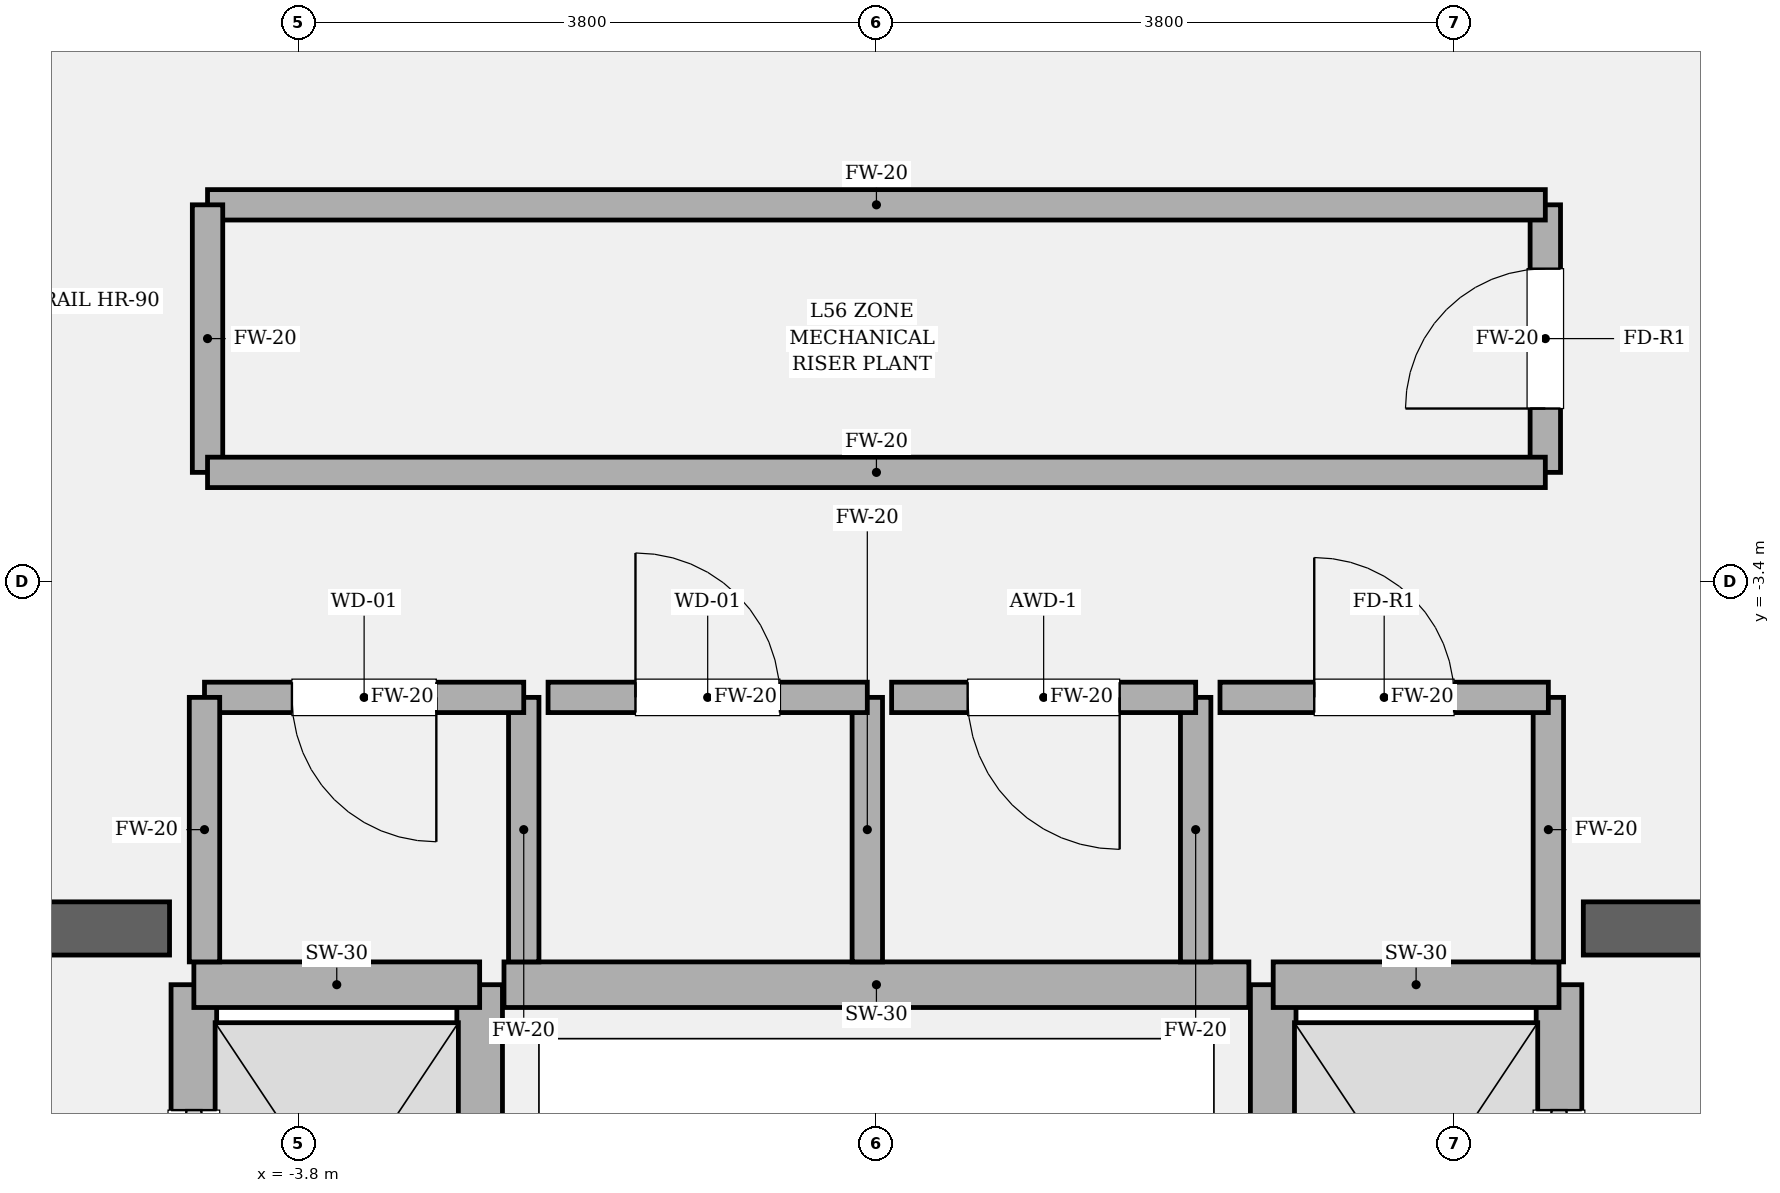
"""IFC4 building model, lengths in metres.
Left out: names, types, materials, properties, quantities, classifications, styles, units other than length and angle.
Written with IfcOpenShell. Run it as: python <this file> out.ifc"""

import sys

from ifc_helpers import new_model, si_unit, direction, frame, frame_2d, origin, place, context, subcontext, project, spatial, rectangle, extrude, element, fill, save


model = new_model("IFC4")
c1 = context("Model", 3, precision=1e-05, world=origin(), true_north=direction((0.0, 1.0)))
c2 = subcontext(c1, "Body", "Model", "MODEL_VIEW")
j1 = project(units=[si_unit("LENGTHUNIT", "METRE"), si_unit("PLANEANGLEUNIT", "RADIAN")], contexts=[c1])
p1 = place(None, origin())
s1 = spatial("IfcSite", under=j1, at=p1, CompositionType="ELEMENT")
p2 = place(p1, origin())
s2 = spatial("IfcBuilding", under=s1, at=p2, CompositionType="ELEMENT")
p3 = place(p2, frame((0.0, 0.0, 237.0)))
s3 = spatial("IfcBuildingStorey", under=s2, at=p3, CompositionType="ELEMENT", Elevation=237.0)
p4 = place(p3, frame((-9.925, -5.68, 0.0), z_axis=(0.0, 0.0, 1.0), x_axis=(1.0, 0.0, 0.0)))
e1 = element("IfcWall", 1, at=p4, inside=s3, PredefinedType="SOLIDWALL", context=c2, shape_type="SweptSolid", body=[
    extrude(rectangle(XDim=5.275, YDim=0.35, at=frame_2d((2.638, 0.0))), origin(), (0.0, 0.0, 1.0), 4.8),
])
p5 = place(p4, frame((1.385, 0.0, 0.0)))
e2 = element("IfcOpeningElement", 2, at=p5, cuts=e1, PredefinedType="OPENING", context=c2, shape_type="SweptSolid", body=[
    extrude(rectangle(XDim=1.18, YDim=2.2, at=frame_2d((0.59, 1.1))), frame((0.0, 0.185, 0.0), z_axis=(0.0, -1.0, 0.0), x_axis=(1.0, 0.0, 0.0)), (0.0, 0.0, 1.0), 0.37),
])
p6 = place(p3, frame((4.65, -5.68, 0.0), z_axis=(0.0, 0.0, 1.0), x_axis=(1.0, 0.0, 0.0)))
e3 = element("IfcWall", 3, at=p6, inside=s3, PredefinedType="SOLIDWALL", context=c2, shape_type="SweptSolid", body=[
    extrude(rectangle(XDim=5.275, YDim=0.35, at=frame_2d((2.638, 0.0))), origin(), (0.0, 0.0, 1.0), 4.8),
])
p7 = place(p6, frame((2.71, 0.0, 0.0)))
e4 = element("IfcOpeningElement", 4, at=p7, cuts=e3, PredefinedType="OPENING", context=c2, shape_type="SweptSolid", body=[
    extrude(rectangle(XDim=1.18, YDim=2.2, at=frame_2d((0.59, 1.1))), frame((0.0, 0.185, 0.0), z_axis=(0.0, -1.0, 0.0), x_axis=(1.0, 0.0, 0.0)), (0.0, 0.0, 1.0), 0.37),
])
p8 = place(p3, frame((-4.49, -8.82, 0.0), z_axis=(0.0, 0.0, 1.0), x_axis=(0.0, 1.0, 0.0)))
e5 = element("IfcWall", 5, at=p8, inside=s3, PredefinedType="SOLIDWALL", context=c2, shape_type="SweptSolid", body=[
    extrude(rectangle(XDim=2.77, YDim=0.3, at=frame_2d((1.385, 0.0))), origin(), (0.0, 0.0, 1.0), 4.48),
])
p9 = place(p8, frame((0.825, 0.0, 0.0)))
e6 = element("IfcOpeningElement", 6, at=p9, cuts=e5, PredefinedType="OPENING", context=c2, shape_type="SweptSolid", body=[
    extrude(rectangle(XDim=1.12, YDim=2.25, at=frame_2d((0.56, 1.125))), frame((0.0, 0.16, 0.0), z_axis=(0.0, -1.0, 0.0), x_axis=(1.0, 0.0, 0.0)), (0.0, 0.0, 1.0), 0.32),
])
p10 = place(p3, frame((-2.61, -8.82, 0.0), z_axis=(0.0, 0.0, 1.0), x_axis=(0.0, 1.0, 0.0)))
e7 = element("IfcWall", 7, at=p10, inside=s3, PredefinedType="SOLIDWALL", context=c2, shape_type="SweptSolid", body=[
    extrude(rectangle(XDim=2.77, YDim=0.3, at=frame_2d((1.385, 0.0))), origin(), (0.0, 0.0, 1.0), 4.48),
])
p11 = place(p3, frame((-4.49, -6.05, 0.0), z_axis=(0.0, 0.0, 1.0), x_axis=(1.0, 0.0, 0.0)))
e8 = element("IfcWall", 8, at=p11, inside=s3, PredefinedType="SOLIDWALL", context=c2, shape_type="SweptSolid", body=[
    extrude(rectangle(XDim=1.88, YDim=0.3, at=frame_2d((0.94, 0.0))), origin(), (0.0, 0.0, 1.0), 4.48),
])
p12 = place(p3, frame((4.49, -8.82, 0.0), z_axis=(0.0, 0.0, 1.0), x_axis=(0.0, 1.0, 0.0)))
e9 = element("IfcWall", 9, at=p12, inside=s3, PredefinedType="SOLIDWALL", context=c2, shape_type="SweptSolid", body=[
    extrude(rectangle(XDim=2.77, YDim=0.3, at=frame_2d((1.385, 0.0))), origin(), (0.0, 0.0, 1.0), 4.48),
])
p13 = place(p12, frame((0.825, 0.0, 0.0)))
e10 = element("IfcOpeningElement", 10, at=p13, cuts=e9, PredefinedType="OPENING", context=c2, shape_type="SweptSolid", body=[
    extrude(rectangle(XDim=1.12, YDim=2.25, at=frame_2d((0.56, 1.125))), frame((0.0, 0.16, 0.0), z_axis=(0.0, -1.0, 0.0), x_axis=(1.0, 0.0, 0.0)), (0.0, 0.0, 1.0), 0.32),
])
p14 = place(p3, frame((2.61, -8.82, 0.0), z_axis=(0.0, 0.0, 1.0), x_axis=(0.0, 1.0, 0.0)))
e11 = element("IfcWall", 11, at=p14, inside=s3, PredefinedType="SOLIDWALL", context=c2, shape_type="SweptSolid", body=[
    extrude(rectangle(XDim=2.77, YDim=0.3, at=frame_2d((1.385, 0.0))), origin(), (0.0, 0.0, 1.0), 4.48),
])
p15 = place(p3, frame((2.61, -6.05, 0.0), z_axis=(0.0, 0.0, 1.0), x_axis=(1.0, 0.0, 0.0)))
e12 = element("IfcWall", 12, at=p15, inside=s3, PredefinedType="SOLIDWALL", context=c2, shape_type="SweptSolid", body=[
    extrude(rectangle(XDim=1.88, YDim=0.3, at=frame_2d((0.94, 0.0))), origin(), (0.0, 0.0, 1.0), 4.48),
])
p16 = place(p3, frame((-2.45, -6.05, 0.0), z_axis=(0.0, 0.0, 1.0), x_axis=(1.0, 0.0, 0.0)))
e13 = element("IfcWall", 13, at=p16, inside=s3, PredefinedType="SOLIDWALL", context=c2, shape_type="SweptSolid", body=[
    extrude(rectangle(XDim=4.9, YDim=0.3, at=frame_2d((2.45, 0.0))), origin(), (0.0, 0.0, 1.0), 4.48),
])
p17 = place(p3, frame((-2.32, -5.9, 0.0), z_axis=(0.0, 0.0, 1.0), x_axis=(0.0, 1.0, 0.0)))
e14 = element("IfcWall", 14, at=p17, inside=s3, PredefinedType="SOLIDWALL", context=c2, shape_type="SweptSolid", body=[
    extrude(rectangle(XDim=1.74, YDim=0.2, at=frame_2d((0.87, 0.0))), origin(), (0.0, 0.0, 1.0), 4.48),
])
p18 = place(p3, frame((-2.32, -4.16, 0.0), z_axis=(0.0, 0.0, 1.0), x_axis=(-1.0, 0.0, 0.0)))
e15 = element("IfcWall", 15, at=p18, inside=s3, PredefinedType="SOLIDWALL", context=c2, shape_type="SweptSolid", body=[
    extrude(rectangle(XDim=2.1, YDim=0.2, at=frame_2d((1.05, 0.0))), origin(), (0.0, 0.0, 1.0), 4.48),
])
p19 = place(p18, frame((0.575, 0.0, 0.0)))
e16 = element("IfcOpeningElement", 16, at=p19, cuts=e15, PredefinedType="OPENING", context=c2, shape_type="SweptSolid", body=[
    extrude(rectangle(XDim=0.95, YDim=2.15, at=frame_2d((0.475, 1.075))), frame((0.0, 0.11, 0.0), z_axis=(0.0, -1.0, 0.0), x_axis=(1.0, 0.0, 0.0)), (0.0, 0.0, 1.0), 0.22),
])
for number, where, z_axis, x_axis in (
    (17, (-4.42, -4.16, 0.0), (0.0, 0.0, 1.0), (0.0, -1.0, 0.0)),
    (18, (-0.06, -5.9, 0.0), (0.0, 0.0, 1.0), (0.0, 1.0, 0.0)),
):
    element("IfcWall", number, at=place(p3, frame(where, z_axis=z_axis, x_axis=x_axis)), inside=s3, PredefinedType="SOLIDWALL", context=c2, shape_type="SweptSolid", body=[
        extrude(rectangle(XDim=1.74, YDim=0.2, at=frame_2d((0.87, 0.0))), origin(), (0.0, 0.0, 1.0), 4.48),
    ])
p20 = place(p3, frame((-0.06, -4.16, 0.0), z_axis=(0.0, 0.0, 1.0), x_axis=(-1.0, 0.0, 0.0)))
e19 = element("IfcWall", 19, at=p20, inside=s3, PredefinedType="SOLIDWALL", context=c2, shape_type="SweptSolid", body=[
    extrude(rectangle(XDim=2.1, YDim=0.2, at=frame_2d((1.05, 0.0))), origin(), (0.0, 0.0, 1.0), 4.48),
])
p21 = place(p20, frame((0.575, 0.0, 0.0)))
e20 = element("IfcOpeningElement", 20, at=p21, cuts=e19, PredefinedType="OPENING", context=c2, shape_type="SweptSolid", body=[
    extrude(rectangle(XDim=0.95, YDim=2.15, at=frame_2d((0.475, 1.075))), frame((0.0, 0.11, 0.0), z_axis=(0.0, -1.0, 0.0), x_axis=(1.0, 0.0, 0.0)), (0.0, 0.0, 1.0), 0.22),
])
p22 = place(p3, frame((2.1, -5.9, 0.0), z_axis=(0.0, 0.0, 1.0), x_axis=(0.0, 1.0, 0.0)))
e21 = element("IfcWall", 21, at=p22, inside=s3, PredefinedType="SOLIDWALL", context=c2, shape_type="SweptSolid", body=[
    extrude(rectangle(XDim=1.74, YDim=0.2, at=frame_2d((0.87, 0.0))), origin(), (0.0, 0.0, 1.0), 4.48),
])
p23 = place(p3, frame((2.1, -4.16, 0.0), z_axis=(0.0, 0.0, 1.0), x_axis=(-1.0, 0.0, 0.0)))
e22 = element("IfcWall", 22, at=p23, inside=s3, PredefinedType="SOLIDWALL", context=c2, shape_type="SweptSolid", body=[
    extrude(rectangle(XDim=2.0, YDim=0.2, at=frame_2d((1.0, 0.0))), origin(), (0.0, 0.0, 1.0), 4.48),
])
p24 = place(p23, frame((0.5, 0.0, 0.0)))
e23 = element("IfcOpeningElement", 23, at=p24, cuts=e22, PredefinedType="OPENING", context=c2, shape_type="SweptSolid", body=[
    extrude(rectangle(XDim=1.0, YDim=2.15, at=frame_2d((0.5, 1.075))), frame((0.0, 0.11, 0.0), z_axis=(0.0, -1.0, 0.0), x_axis=(1.0, 0.0, 0.0)), (0.0, 0.0, 1.0), 0.22),
])
p25 = place(p3, frame((4.42, -5.9, 0.0), z_axis=(0.0, 0.0, 1.0), x_axis=(0.0, 1.0, 0.0)))
e24 = element("IfcWall", 24, at=p25, inside=s3, PredefinedType="SOLIDWALL", context=c2, shape_type="SweptSolid", body=[
    extrude(rectangle(XDim=1.74, YDim=0.2, at=frame_2d((0.87, 0.0))), origin(), (0.0, 0.0, 1.0), 4.48),
])
p26 = place(p3, frame((4.42, -4.16, 0.0), z_axis=(0.0, 0.0, 1.0), x_axis=(-1.0, 0.0, 0.0)))
e25 = element("IfcWall", 25, at=p26, inside=s3, PredefinedType="SOLIDWALL", context=c2, shape_type="SweptSolid", body=[
    extrude(rectangle(XDim=2.16, YDim=0.2, at=frame_2d((1.08, 0.0))), origin(), (0.0, 0.0, 1.0), 4.48),
])
p27 = place(p26, frame((0.62, 0.0, 0.0)))
e26 = element("IfcOpeningElement", 26, at=p27, cuts=e25, PredefinedType="OPENING", context=c2, shape_type="SweptSolid", body=[
    extrude(rectangle(XDim=0.92, YDim=2.1, at=frame_2d((0.46, 1.05))), frame((0.0, 0.11, 0.0), z_axis=(0.0, -1.0, 0.0), x_axis=(1.0, 0.0, 0.0)), (0.0, 0.0, 1.0), 0.22),
])
p28 = place(p3, frame((4.4, -2.68, 0.0), z_axis=(0.0, 0.0, 1.0), x_axis=(0.0, 1.0, 0.0)))
e27 = element("IfcWall", 27, at=p28, inside=s3, PredefinedType="SOLIDWALL", context=c2, shape_type="SweptSolid", body=[
    extrude(rectangle(XDim=1.76, YDim=0.2, at=frame_2d((0.88, 0.0))), origin(), (0.0, 0.0, 1.0), 4.48),
])
p29 = place(p28, frame((0.42, 0.0, 0.0)))
e28 = element("IfcOpeningElement", 28, at=p29, cuts=e27, PredefinedType="OPENING", context=c2, shape_type="SweptSolid", body=[
    extrude(rectangle(XDim=0.92, YDim=2.1, at=frame_2d((0.46, 1.05))), frame((0.0, 0.11, 0.0), z_axis=(0.0, -1.0, 0.0), x_axis=(1.0, 0.0, 0.0)), (0.0, 0.0, 1.0), 0.22),
])
p30 = place(p3, frame((4.4, -0.92, 0.0), z_axis=(0.0, 0.0, 1.0), x_axis=(-1.0, 0.0, 0.0)))
e29 = element("IfcWall", 29, at=p30, inside=s3, PredefinedType="SOLIDWALL", context=c2, shape_type="SweptSolid", body=[
    extrude(rectangle(XDim=8.8, YDim=0.2, at=frame_2d((4.4, 0.0))), origin(), (0.0, 0.0, 1.0), 4.48),
])
p31 = place(p3, frame((-4.4, -0.92, 0.0), z_axis=(0.0, 0.0, 1.0), x_axis=(0.0, -1.0, 0.0)))
e30 = element("IfcWall", 30, at=p31, inside=s3, PredefinedType="SOLIDWALL", context=c2, shape_type="SweptSolid", body=[
    extrude(rectangle(XDim=1.76, YDim=0.2, at=frame_2d((0.88, 0.0))), origin(), (0.0, 0.0, 1.0), 4.48),
])
p32 = place(p3, frame((-4.4, -2.68, 0.0), z_axis=(0.0, 0.0, 1.0), x_axis=(1.0, 0.0, 0.0)))
e31 = element("IfcWall", 31, at=p32, inside=s3, PredefinedType="SOLIDWALL", context=c2, shape_type="SweptSolid", body=[
    extrude(rectangle(XDim=8.8, YDim=0.2, at=frame_2d((4.4, 0.0))), origin(), (0.0, 0.0, 1.0), 4.48),
])
p33 = place(p9, origin())
e32 = element("IfcDoor", 32, at=p33, inside=s3, OperationType="SLIDING_TO_LEFT", PredefinedType="DOOR", context=c2, shape_type="SweptSolid", body=[
    extrude(rectangle(XDim=1.12, YDim=2.25, at=frame_2d((0.56, 1.125))), frame((0.0, 0.025, 0.0), z_axis=(0.0, -1.0, 0.0), x_axis=(1.0, 0.0, 0.0)), (0.0, 0.0, 1.0), 0.05),
])
fill(e6, e32)
p34 = place(p13, origin())
e33 = element("IfcDoor", 33, at=p34, inside=s3, OperationType="SLIDING_TO_RIGHT", PredefinedType="DOOR", context=c2, shape_type="SweptSolid", body=[
    extrude(rectangle(XDim=1.12, YDim=2.25, at=frame_2d((0.56, 1.125))), frame((0.0, 0.025, 0.0), z_axis=(0.0, -1.0, 0.0), x_axis=(1.0, 0.0, 0.0)), (0.0, 0.0, 1.0), 0.05),
])
fill(e10, e33)
p35 = place(p19, origin())
e34 = element("IfcDoor", 34, at=p35, inside=s3, OperationType="SINGLE_SWING_LEFT", PredefinedType="DOOR", context=c2, shape_type="SweptSolid", body=[
    extrude(rectangle(XDim=0.95, YDim=2.15, at=frame_2d((0.475, 1.075))), frame((0.0, 0.025, 0.0), z_axis=(0.0, -1.0, 0.0), x_axis=(1.0, 0.0, 0.0)), (0.0, 0.0, 1.0), 0.05),
])
fill(e16, e34)
p36 = place(p21, origin())
e35 = element("IfcDoor", 35, at=p36, inside=s3, OperationType="SINGLE_SWING_RIGHT", PredefinedType="DOOR", context=c2, shape_type="SweptSolid", body=[
    extrude(rectangle(XDim=0.95, YDim=2.15, at=frame_2d((0.475, 1.075))), frame((0.0, 0.025, 0.0), z_axis=(0.0, -1.0, 0.0), x_axis=(1.0, 0.0, 0.0)), (0.0, 0.0, 1.0), 0.05),
])
fill(e20, e35)
p37 = place(p24, origin())
e36 = element("IfcDoor", 36, at=p37, inside=s3, OperationType="SINGLE_SWING_LEFT", PredefinedType="DOOR", context=c2, shape_type="SweptSolid", body=[
    extrude(rectangle(XDim=1.0, YDim=2.15, at=frame_2d((0.5, 1.075))), frame((0.0, 0.025, 0.0), z_axis=(0.0, -1.0, 0.0), x_axis=(1.0, 0.0, 0.0)), (0.0, 0.0, 1.0), 0.05),
])
fill(e23, e36)
p38 = place(p27, origin())
e37 = element("IfcDoor", 37, at=p38, inside=s3, OperationType="SINGLE_SWING_RIGHT", PredefinedType="DOOR", context=c2, shape_type="SweptSolid", body=[
    extrude(rectangle(XDim=0.92, YDim=2.1, at=frame_2d((0.46, 1.05))), frame((0.0, 0.025, 0.0), z_axis=(0.0, -1.0, 0.0), x_axis=(1.0, 0.0, 0.0)), (0.0, 0.0, 1.0), 0.05),
])
fill(e26, e37)
p39 = place(p29, origin())
e38 = element("IfcDoor", 38, at=p39, inside=s3, OperationType="SINGLE_SWING_LEFT", PredefinedType="DOOR", context=c2, shape_type="SweptSolid", body=[
    extrude(rectangle(XDim=0.92, YDim=2.1, at=frame_2d((0.46, 1.05))), frame((0.0, 0.025, 0.0), z_axis=(0.0, -1.0, 0.0), x_axis=(1.0, 0.0, 0.0)), (0.0, 0.0, 1.0), 0.05),
])
fill(e28, e38)
save(model, sys.argv[1])
